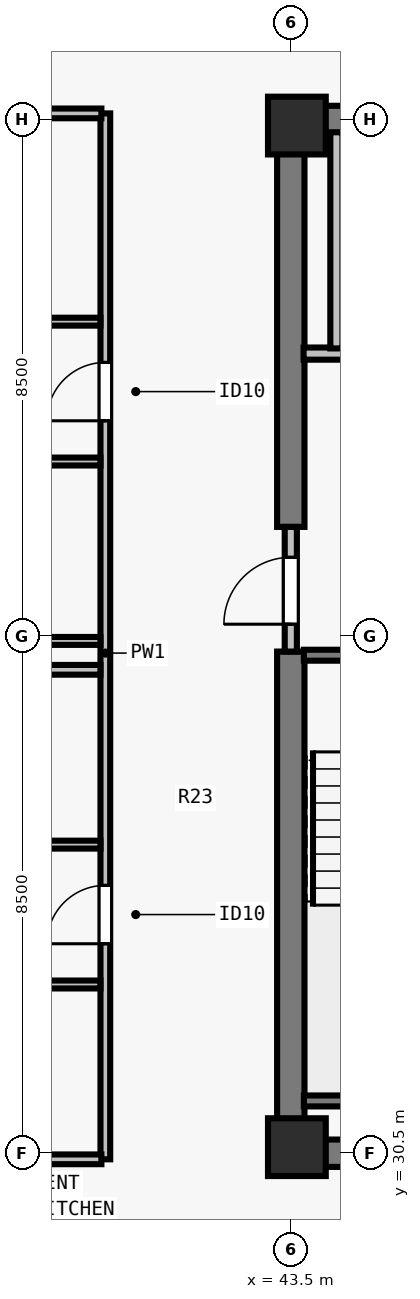
"""IFC4 building model, lengths in metres.
Left out: names, types, materials, properties, quantities, classifications, styles, units other than length and angle.
Written with IfcOpenShell. Run it as: python <this file> out.ifc"""

import sys

from ifc_helpers import new_model, si_unit, direction, frame, frame_2d, origin, origin_2d, place, context, subcontext, project, spatial, rectangle, extrude, element, fill, save


model = new_model("IFC4")
c1 = context("Model", 3, precision=1e-05, world=origin(), true_north=direction((0.0, 1.0)))
c2 = subcontext(c1, "Body", "Model", "MODEL_VIEW")
j1 = project(units=[si_unit("LENGTHUNIT", "METRE"), si_unit("PLANEANGLEUNIT", "RADIAN")], contexts=[c1])
p1 = place(None, origin())
s1 = spatial("IfcSite", under=j1, at=p1, CompositionType="ELEMENT")
p2 = place(p1, origin())
s2 = spatial("IfcBuilding", under=s1, at=p2, CompositionType="ELEMENT")
p3 = place(p2, frame((0.0, 0.0, 248.0)))
s3 = spatial("IfcBuildingStorey", under=s2, at=p3, CompositionType="ELEMENT", Elevation=248.0)
for number, where, z_axis, x_axis in (
    (1, (43.6, 30.6, 0.0), (0.0, 0.0, 1.0), (1.0, 0.0, 0.0)),
    (2, (43.6, 47.4, 0.0), (0.0, 0.0, 1.0), (1.0, 0.0, 0.0)),
):
    element("IfcColumn", number, at=place(p3, frame(where, z_axis=z_axis, x_axis=x_axis)), inside=s3, PredefinedType="COLUMN", context=c2, shape_type="SweptSolid", body=[
        extrude(rectangle(XDim=0.95, YDim=0.95, at=origin_2d()), origin(), (0.0, 0.0, 1.0), 3.5),
    ])
for number, where, z_axis, x_axis in (
    (3, (43.275, 30.5, 0.0), (0.0, 0.0, 1.0), (1.0, 0.0, 0.0)),
    (4, (43.275, 47.5, 0.0), (0.0, 0.0, 1.0), (1.0, 0.0, 0.0)),
):
    element("IfcWall", number, at=place(p3, frame(where, z_axis=z_axis, x_axis=x_axis)), inside=s3, PredefinedType="SHEAR", context=c2, shape_type="SweptSolid", body=[
        extrude(rectangle(XDim=17.45, YDim=0.45, at=frame_2d((8.725, 0.0))), origin(), (0.0, 0.0, 1.0), 3.29),
    ])
p4 = place(p3, frame((43.5, 30.715, 0.0), z_axis=(0.0, 0.0, 1.0), x_axis=(0.0, 1.0, 0.0)))
e5 = element("IfcWall", 5, at=p4, inside=s3, PredefinedType="SHEAR", context=c2, shape_type="SweptSolid", body=[
    extrude(rectangle(XDim=8.035, YDim=0.45, at=frame_2d((4.018, 0.0))), origin(), (0.0, 0.0, 1.0), 3.29),
])
p5 = place(p3, frame((43.5, 40.8, 0.0), z_axis=(0.0, 0.0, 1.0), x_axis=(0.0, 1.0, 0.0)))
e6 = element("IfcWall", 6, at=p5, inside=s3, PredefinedType="SHEAR", context=c2, shape_type="SweptSolid", body=[
    extrude(rectangle(XDim=6.485, YDim=0.45, at=frame_2d((3.242, 0.0))), origin(), (0.0, 0.0, 1.0), 3.29),
])
p6 = place(p3, frame((43.5, 38.75, 0.0), z_axis=(0.0, 0.0, 1.0), x_axis=(0.0, 1.0, 0.0)))
e7 = element("IfcWall", 7, at=p6, inside=s3, PredefinedType="SOLIDWALL", context=c2, shape_type="SweptSolid", body=[
    extrude(rectangle(XDim=2.05, YDim=0.2, at=frame_2d((1.025, 0.0))), origin(), (0.0, 0.0, 1.0), 3.29),
])
p7 = place(p6, frame((0.45, 0.0, 0.0)))
e8 = element("IfcOpeningElement", 8, at=p7, cuts=e7, PredefinedType="OPENING", context=c2, shape_type="SweptSolid", body=[
    extrude(rectangle(XDim=1.1, YDim=2.15, at=frame_2d((0.55, 1.075))), frame((0.0, 0.11, 0.0), z_axis=(0.0, -1.0, 0.0), x_axis=(1.0, 0.0, 0.0)), (0.0, 0.0, 1.0), 0.22),
])
p8 = place(p3, frame((43.71, 43.65, 0.0), z_axis=(0.0, 0.0, 1.0), x_axis=(1.0, 0.0, 0.0)))
e9 = element("IfcWall", 9, at=p8, inside=s3, PredefinedType="SOLIDWALL", context=c2, shape_type="SweptSolid", body=[
    extrude(rectangle(XDim=3.555, YDim=0.2, at=frame_2d((1.777, 0.0))), origin(), (0.0, 0.0, 1.0), 3.29),
])
p9 = place(p8, frame((1.16, 0.0, 0.0)))
e10 = element("IfcOpeningElement", 10, at=p9, cuts=e9, PredefinedType="OPENING", context=c2, shape_type="SweptSolid", body=[
    extrude(rectangle(XDim=1.1, YDim=2.2, at=frame_2d((0.55, 1.1))), frame((0.0, 0.11, 0.0), z_axis=(0.0, -1.0, 0.0), x_axis=(1.0, 0.0, 0.0)), (0.0, 0.0, 1.0), 0.22),
])
p10 = place(p3, frame((44.25, 43.735, 0.0), z_axis=(0.0, 0.0, 1.0), x_axis=(0.0, 1.0, 0.0)))
e11 = element("IfcWall", 11, at=p10, inside=s3, PredefinedType="SOLIDWALL", context=c2, shape_type="SweptSolid", body=[
    extrude(rectangle(XDim=3.555, YDim=0.2, at=frame_2d((1.777, 0.0))), origin(), (0.0, 0.0, 1.0), 3.29),
])
p11 = place(p3, frame((40.45, 30.4, 0.0), z_axis=(0.0, 0.0, 1.0), x_axis=(0.0, 1.0, 0.0)))
e12 = element("IfcWall", 12, at=p11, inside=s3, PredefinedType="PARTITIONING", context=c2, shape_type="SweptSolid", body=[
    extrude(rectangle(XDim=17.2, YDim=0.16, at=frame_2d((8.6, 0.0))), origin(), (0.0, 0.0, 1.0), 3.29),
])
p12 = place(p11, frame((3.545, 0.0, 0.0)))
e13 = element("IfcOpeningElement", 13, at=p12, cuts=e12, PredefinedType="OPENING", context=c2, shape_type="SweptSolid", body=[
    extrude(rectangle(XDim=0.96, YDim=2.18, at=frame_2d((0.48, 1.09))), frame((0.0, 0.09, 0.0), z_axis=(0.0, -1.0, 0.0), x_axis=(1.0, 0.0, 0.0)), (0.0, 0.0, 1.0), 0.18),
])
p13 = place(p11, frame((12.145, 0.0, 0.0)))
e14 = element("IfcOpeningElement", 14, at=p13, cuts=e12, PredefinedType="OPENING", context=c2, shape_type="SweptSolid", body=[
    extrude(rectangle(XDim=0.96, YDim=2.18, at=frame_2d((0.48, 1.09))), frame((0.0, 0.09, 0.0), z_axis=(0.0, -1.0, 0.0), x_axis=(1.0, 0.0, 0.0)), (0.0, 0.0, 1.0), 0.18),
])
p14 = place(p3, frame((29.77, 30.4, 0.0), z_axis=(0.0, 0.0, 1.0), x_axis=(1.0, 0.0, 0.0)))
e15 = element("IfcWall", 15, at=p14, inside=s3, PredefinedType="PARTITIONING", context=c2, shape_type="SweptSolid", body=[
    extrude(rectangle(XDim=10.615, YDim=0.16, at=frame_2d((5.308, 0.0))), origin(), (0.0, 0.0, 1.0), 3.29),
])
p15 = place(p3, frame((29.805, 47.6, 0.0), z_axis=(0.0, 0.0, 1.0), x_axis=(1.0, 0.0, 0.0)))
e16 = element("IfcWall", 16, at=p15, inside=s3, PredefinedType="PARTITIONING", context=c2, shape_type="SweptSolid", body=[
    extrude(rectangle(XDim=10.58, YDim=0.16, at=frame_2d((5.29, 0.0))), origin(), (0.0, 0.0, 1.0), 3.29),
])
p16 = place(p3, frame((29.805, 38.45, 0.0), z_axis=(0.0, 0.0, 1.0), x_axis=(1.0, 0.0, 0.0)))
e17 = element("IfcWall", 17, at=p16, inside=s3, PredefinedType="PARTITIONING", context=c2, shape_type="SweptSolid", body=[
    extrude(rectangle(XDim=10.565, YDim=0.16, at=frame_2d((5.283, 0.0))), origin(), (0.0, 0.0, 1.0), 2.958),
])
p17 = place(p3, frame((37.62, 33.275, 0.0), z_axis=(0.0, 0.0, 1.0), x_axis=(1.0, 0.0, 0.0)))
e18 = element("IfcWall", 18, at=p17, inside=s3, PredefinedType="PLUMBINGWALL", context=c2, shape_type="SweptSolid", body=[
    extrude(rectangle(XDim=2.75, YDim=0.13, at=frame_2d((1.375, 0.0))), origin(), (0.0, 0.0, 1.0), 3.29),
])
p18 = place(p17, frame((0.55, 0.0, 0.0)))
e19 = element("IfcOpeningElement", 19, at=p18, cuts=e18, PredefinedType="OPENING", context=c2, shape_type="SweptSolid", body=[
    extrude(rectangle(XDim=0.85, YDim=2.08, at=frame_2d((0.425, 1.04))), frame((0.0, 0.075, 0.0), z_axis=(0.0, -1.0, 0.0), x_axis=(1.0, 0.0, 0.0)), (0.0, 0.0, 1.0), 0.15),
])
p19 = place(p3, frame((37.62, 35.575, 0.0), z_axis=(0.0, 0.0, 1.0), x_axis=(1.0, 0.0, 0.0)))
e20 = element("IfcWall", 20, at=p19, inside=s3, PredefinedType="PLUMBINGWALL", context=c2, shape_type="SweptSolid", body=[
    extrude(rectangle(XDim=2.75, YDim=0.13, at=frame_2d((1.375, 0.0))), origin(), (0.0, 0.0, 1.0), 3.29),
])
p20 = place(p19, frame((0.55, 0.0, 0.0)))
e21 = element("IfcOpeningElement", 21, at=p20, cuts=e20, PredefinedType="OPENING", context=c2, shape_type="SweptSolid", body=[
    extrude(rectangle(XDim=0.88, YDim=2.1, at=frame_2d((0.44, 1.05))), frame((0.0, 0.075, 0.0), z_axis=(0.0, -1.0, 0.0), x_axis=(1.0, 0.0, 0.0)), (0.0, 0.0, 1.0), 0.15),
])
p21 = place(p3, frame((37.62, 38.925, 0.0), z_axis=(0.0, 0.0, 1.0), x_axis=(1.0, 0.0, 0.0)))
e22 = element("IfcWall", 22, at=p21, inside=s3, PredefinedType="PLUMBINGWALL", context=c2, shape_type="SweptSolid", body=[
    extrude(rectangle(XDim=2.75, YDim=0.13, at=frame_2d((1.375, 0.0))), origin(), (0.0, 0.0, 1.0), 3.29),
])
p22 = place(p3, frame((37.62, 41.875, 0.0), z_axis=(0.0, 0.0, 1.0), x_axis=(1.0, 0.0, 0.0)))
e23 = element("IfcWall", 23, at=p22, inside=s3, PredefinedType="PLUMBINGWALL", context=c2, shape_type="SweptSolid", body=[
    extrude(rectangle(XDim=2.75, YDim=0.13, at=frame_2d((1.375, 0.0))), origin(), (0.0, 0.0, 1.0), 2.958),
])
p23 = place(p22, frame((0.55, 0.0, 0.0)))
e24 = element("IfcOpeningElement", 24, at=p23, cuts=e23, PredefinedType="OPENING", context=c2, shape_type="SweptSolid", body=[
    extrude(rectangle(XDim=0.85, YDim=2.08, at=frame_2d((0.425, 1.04))), frame((0.0, 0.075, 0.0), z_axis=(0.0, -1.0, 0.0), x_axis=(1.0, 0.0, 0.0)), (0.0, 0.0, 1.0), 0.15),
])
p24 = place(p3, frame((37.62, 44.175, 0.0), z_axis=(0.0, 0.0, 1.0), x_axis=(1.0, 0.0, 0.0)))
e25 = element("IfcWall", 25, at=p24, inside=s3, PredefinedType="PLUMBINGWALL", context=c2, shape_type="SweptSolid", body=[
    extrude(rectangle(XDim=2.75, YDim=0.13, at=frame_2d((1.375, 0.0))), origin(), (0.0, 0.0, 1.0), 2.958),
])
p25 = place(p24, frame((0.55, 0.0, 0.0)))
e26 = element("IfcOpeningElement", 26, at=p25, cuts=e25, PredefinedType="OPENING", context=c2, shape_type="SweptSolid", body=[
    extrude(rectangle(XDim=0.88, YDim=2.1, at=frame_2d((0.44, 1.05))), frame((0.0, 0.075, 0.0), z_axis=(0.0, -1.0, 0.0), x_axis=(1.0, 0.0, 0.0)), (0.0, 0.0, 1.0), 0.15),
])
p26 = place(p3, frame((43.715, 38.69, 0.0), z_axis=(0.0, 0.0, 1.0), x_axis=(1.0, 0.0, 0.0)))
e27 = element("IfcWall", 27, at=p26, inside=s3, PredefinedType="SOLIDWALL", context=c2, shape_type="SweptSolid", body=[
    extrude(rectangle(XDim=3.28, YDim=0.18, at=frame_2d((1.64, 0.0))), origin(), (0.0, 0.0, 1.0), 3.29),
])
p27 = place(p26, frame((1.165, 0.0, 0.0)))
e28 = element("IfcOpeningElement", 28, at=p27, cuts=e27, PredefinedType="OPENING", context=c2, shape_type="SweptSolid", body=[
    extrude(rectangle(XDim=0.95, YDim=2.15, at=frame_2d((0.475, 1.075))), frame((0.0, 0.1, 0.0), z_axis=(0.0, -1.0, 0.0), x_axis=(1.0, 0.0, 0.0)), (0.0, 0.0, 1.0), 0.2),
])
p28 = place(p3, frame((43.715, 31.36, 0.0), z_axis=(0.0, 0.0, 1.0), x_axis=(1.0, 0.0, 0.0)))
e29 = element("IfcWall", 29, at=p28, inside=s3, PredefinedType="SOLIDWALL", context=c2, shape_type="SweptSolid", body=[
    extrude(rectangle(XDim=3.28, YDim=0.18, at=frame_2d((1.64, 0.0))), origin(), (0.0, 0.0, 1.0), 3.29),
])
p29 = place(p7, origin())
e30 = element("IfcDoor", 30, at=p29, inside=s3, OperationType="SINGLE_SWING_LEFT", PredefinedType="DOOR", context=c2, shape_type="SweptSolid", body=[
    extrude(rectangle(XDim=1.1, YDim=2.15, at=frame_2d((0.55, 1.075))), frame((0.0, 0.025, 0.0), z_axis=(0.0, -1.0, 0.0), x_axis=(1.0, 0.0, 0.0)), (0.0, 0.0, 1.0), 0.05),
])
fill(e8, e30)
p30 = place(p12, origin())
e31 = element("IfcDoor", 31, at=p30, inside=s3, OperationType="SINGLE_SWING_LEFT", PredefinedType="DOOR", context=c2, shape_type="SweptSolid", body=[
    extrude(rectangle(XDim=0.96, YDim=2.18, at=frame_2d((0.48, 1.09))), frame((0.0, 0.025, 0.0), z_axis=(0.0, -1.0, 0.0), x_axis=(1.0, 0.0, 0.0)), (0.0, 0.0, 1.0), 0.05),
])
fill(e13, e31)
p31 = place(p13, origin())
e32 = element("IfcDoor", 32, at=p31, inside=s3, OperationType="SINGLE_SWING_LEFT", PredefinedType="DOOR", context=c2, shape_type="SweptSolid", body=[
    extrude(rectangle(XDim=0.96, YDim=2.18, at=frame_2d((0.48, 1.09))), frame((0.0, 0.025, 0.0), z_axis=(0.0, -1.0, 0.0), x_axis=(1.0, 0.0, 0.0)), (0.0, 0.0, 1.0), 0.05),
])
fill(e14, e32)
save(model, sys.argv[1])
